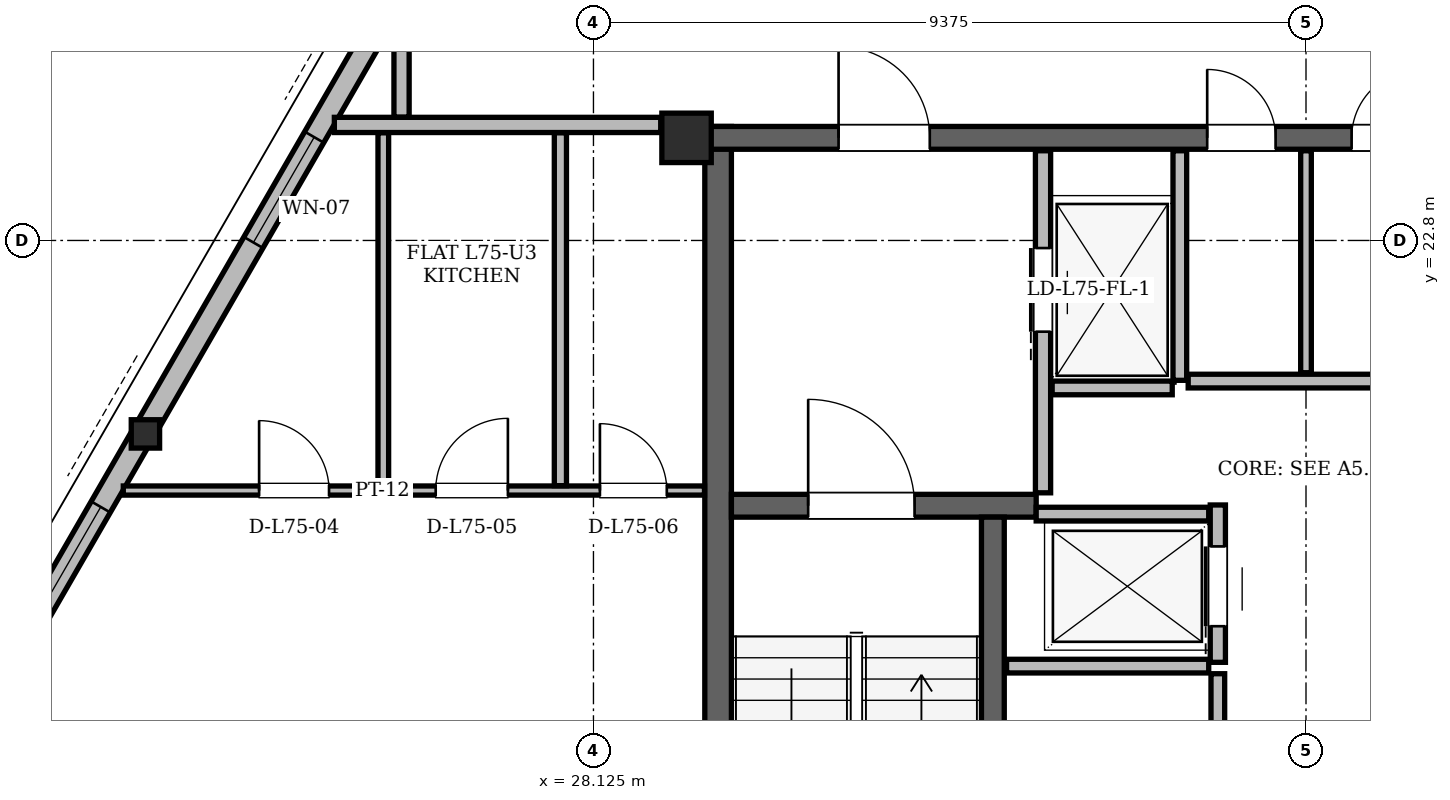
"""IFC4 building model, lengths in metres.
Left out: names, types, materials, properties, quantities, classifications, styles, units other than length and angle.
Written with IfcOpenShell. Run it as: python <this file> out.ifc"""

import sys

from ifc_helpers import new_model, si_unit, direction, frame, frame_2d, origin, origin_2d, place, context, subcontext, project, spatial, rectangle, hollow_rectangle, i_section, extrude, element, fill, save


model = new_model("IFC4")
c1 = context("Model", 3, precision=1e-05, world=origin(), true_north=direction((0.0, 1.0)))
c2 = subcontext(c1, "Body", "Model", "MODEL_VIEW")
j1 = project(units=[si_unit("LENGTHUNIT", "METRE"), si_unit("PLANEANGLEUNIT", "RADIAN")], contexts=[c1])
p1 = place(None, origin())
s1 = spatial("IfcSite", under=j1, at=p1, CompositionType="ELEMENT")
p2 = place(p1, origin())
s2 = spatial("IfcBuilding", under=s1, at=p2, CompositionType="ELEMENT")
p3 = place(p2, frame((0.0, 0.0, 285.0)))
s3 = spatial("IfcBuildingStorey", under=s2, at=p3, CompositionType="ELEMENT", Elevation=285.0)
p4 = place(p3, frame((29.35, 24.15, 0.0), z_axis=(0.0, 0.0, 1.0), x_axis=(1.0, 0.0, 0.0)))
e1 = element("IfcColumn", 1, at=p4, inside=s3, PredefinedType="COLUMN", context=c2, shape_type="SweptSolid", body=[
    extrude(hollow_rectangle(XDim=0.65, YDim=0.65, WallThickness=0.05, at=origin_2d()), origin(), (0.0, 0.0, 1.0), 3.9),
])
p5 = place(p3, frame((22.208, 20.273, 0.004), z_axis=(0.011668917641, -0.009347681336, 0.99988822236), x_axis=(0.625206622887, 0.780459274208, 0.0)))
e2 = element("IfcColumn", 2, at=p5, inside=s3, PredefinedType="COLUMN", context=c2, shape_type="SweptSolid", body=[
    extrude(i_section(OverallWidth=0.373, OverallDepth=0.373, WebThickness=0.016, FlangeThickness=0.026, at=origin_2d()), origin(), (0.0, 0.0, 1.0), 3.892),
])
p6 = place(p3, frame((29.765, 11.0, 0.0), z_axis=(0.0, 0.0, 1.0), x_axis=(0.0, 1.0, 0.0)))
e3 = element("IfcWall", 3, at=p6, inside=s3, PredefinedType="SHEAR", context=c2, shape_type="SweptSolid", body=[
    extrude(rectangle(XDim=13.3, YDim=0.35, at=frame_2d((6.65, 0.0))), origin(), (0.0, 0.0, 1.0), 3.68),
])
p7 = place(p3, frame((29.65, 24.15, 0.0), z_axis=(0.0, 0.0, 1.0), x_axis=(1.0, 0.0, 0.0)))
e4 = element("IfcWall", 4, at=p7, inside=s3, PredefinedType="SHEAR", context=c2, shape_type="SweptSolid", body=[
    extrude(rectangle(XDim=15.7, YDim=0.3, at=frame_2d((7.85, 0.0))), origin(), (0.0, 0.0, 1.0), 3.68),
])
p8 = place(p7, frame((1.7, 0.0, 0.0)))
e5 = element("IfcOpeningElement", 5, at=p8, cuts=e4, PredefinedType="OPENING", context=c2, shape_type="SweptSolid", body=[
    extrude(rectangle(XDim=1.2, YDim=2.2, at=frame_2d((0.6, 1.1))), frame((0.0, 0.15, 0.0), z_axis=(0.0, -1.0, 0.0), x_axis=(1.0, 0.0, 0.0)), (0.0, 0.0, 1.0), 0.3),
])
p9 = place(p7, frame((12.8, 0.0, 0.0)))
e6 = element("IfcOpeningElement", 6, at=p9, cuts=e4, PredefinedType="OPENING", context=c2, shape_type="SweptSolid", body=[
    extrude(rectangle(XDim=1.2, YDim=2.2, at=frame_2d((0.6, 1.1))), frame((0.0, 0.15, 0.0), z_axis=(0.0, -1.0, 0.0), x_axis=(1.0, 0.0, 0.0)), (0.0, 0.0, 1.0), 0.3),
])
p10 = place(p7, frame((6.55, 0.0, 0.0)))
e7 = element("IfcOpeningElement", 7, at=p10, cuts=e4, PredefinedType="OPENING", context=c2, shape_type="SweptSolid", body=[
    extrude(rectangle(XDim=0.9, YDim=2.05, at=frame_2d((0.45, 1.025))), frame((0.0, 0.15, 0.0), z_axis=(0.0, -1.0, 0.0), x_axis=(1.0, 0.0, 0.0)), (0.0, 0.0, 1.0), 0.3),
])
p11 = place(p7, frame((8.45, 0.0, 0.0)))
e8 = element("IfcOpeningElement", 8, at=p11, cuts=e4, PredefinedType="OPENING", context=c2, shape_type="SweptSolid", body=[
    extrude(rectangle(XDim=0.9, YDim=2.05, at=frame_2d((0.45, 1.025))), frame((0.0, 0.15, 0.0), z_axis=(0.0, -1.0, 0.0), x_axis=(1.0, 0.0, 0.0)), (0.0, 0.0, 1.0), 0.3),
])
p12 = place(p3, frame((29.94, 19.31, 0.0), z_axis=(0.0, 0.0, 1.0), x_axis=(1.0, 0.0, 0.0)))
e9 = element("IfcWall", 9, at=p12, inside=s3, PredefinedType="SHEAR", context=c2, shape_type="SweptSolid", body=[
    extrude(rectangle(XDim=4.01, YDim=0.3, at=frame_2d((2.005, 0.0))), origin(), (0.0, 0.0, 1.0), 3.68),
])
p13 = place(p12, frame((1.01, 0.0, 0.0)))
e10 = element("IfcOpeningElement", 10, at=p13, cuts=e9, PredefinedType="OPENING", context=c2, shape_type="SweptSolid", body=[
    extrude(rectangle(XDim=1.4, YDim=2.2, at=frame_2d((0.7, 1.1))), frame((0.0, 0.15, 0.0), z_axis=(0.0, -1.0, 0.0), x_axis=(1.0, 0.0, 0.0)), (0.0, 0.0, 1.0), 0.3),
])
p14 = place(p3, frame((33.38, 11.54, 0.0), z_axis=(0.0, 0.0, 1.0), x_axis=(0.0, 1.0, 0.0)))
e11 = element("IfcWall", 11, at=p14, inside=s3, PredefinedType="SHEAR", context=c2, shape_type="SweptSolid", body=[
    extrude(rectangle(XDim=7.62, YDim=0.3, at=frame_2d((3.81, 0.0))), origin(), (0.0, 0.0, 1.0), 3.68),
])
p15 = place(p3, frame((35.326, 42.995, 0.0), z_axis=(0.0, 0.0, 1.0), x_axis=(-0.499999864727, -0.866025481884, 0.0)))
e12 = element("IfcWall", 12, at=p15, inside=s3, PredefinedType="SOLIDWALL", context=c2, shape_type="SweptSolid", body=[
    extrude(rectangle(XDim=37.481, YDim=0.29, at=frame_2d((18.74, 0.0))), origin(), (0.0, 0.0, 1.0), 3.058),
])
p16 = place(p15, frame((8.034, 0.0, 0.0)))
e13 = element("IfcOpeningElement", 13, at=p16, cuts=e12, PredefinedType="OPENING", context=c2, shape_type="SweptSolid", body=[
    extrude(rectangle(XDim=1.5, YDim=2.2, at=frame_2d((0.75, 1.1))), frame((0.0, 0.145, 0.0), z_axis=(0.0, -1.0, 0.0), x_axis=(1.0, 0.0, 0.0)), (0.0, 0.0, 1.0), 0.29),
])
p17 = place(p15, frame((32.341, 0.0, 0.0)))
e14 = element("IfcOpeningElement", 14, at=p17, cuts=e12, PredefinedType="OPENING", context=c2, shape_type="SweptSolid", body=[
    extrude(rectangle(XDim=1.5, YDim=2.2, at=frame_2d((0.75, 1.1))), frame((0.0, 0.145, 0.0), z_axis=(0.0, -1.0, 0.0), x_axis=(1.0, 0.0, 0.0)), (0.0, 0.0, 1.0), 0.29),
])
p18 = place(p15, frame((35.454, 0.0, 0.85)))
e15 = element("IfcOpeningElement", 15, at=p18, cuts=e12, PredefinedType="OPENING", context=c2, shape_type="SweptSolid", body=[
    extrude(rectangle(XDim=1.2, YDim=1.48, at=frame_2d((0.6, 0.74))), frame((0.0, 0.145, 0.0), z_axis=(0.0, -1.0, 0.0), x_axis=(1.0, 0.0, 0.0)), (0.0, 0.0, 1.0), 0.29),
])
p19 = place(p15, frame((27.367, 0.0, 0.85)))
e16 = element("IfcOpeningElement", 16, at=p19, cuts=e12, PredefinedType="OPENING", context=c2, shape_type="SweptSolid", body=[
    extrude(rectangle(XDim=1.8, YDim=1.75, at=frame_2d((0.9, 0.875))), frame((0.0, 0.145, 0.0), z_axis=(0.0, -1.0, 0.0), x_axis=(1.0, 0.0, 0.0)), (0.0, 0.0, 1.0), 0.29),
])
p20 = place(p15, frame((21.75, 0.0, 0.85)))
e17 = element("IfcOpeningElement", 17, at=p20, cuts=e12, PredefinedType="OPENING", context=c2, shape_type="SweptSolid", body=[
    extrude(rectangle(XDim=1.6, YDim=1.7, at=frame_2d((0.8, 0.85))), frame((0.0, 0.145, 0.0), z_axis=(0.0, -1.0, 0.0), x_axis=(1.0, 0.0, 0.0)), (0.0, 0.0, 1.0), 0.29),
])
p21 = place(p15, frame((16.51, 0.0, 0.85)))
e18 = element("IfcOpeningElement", 18, at=p21, cuts=e12, PredefinedType="OPENING", context=c2, shape_type="SweptSolid", body=[
    extrude(rectangle(XDim=1.8, YDim=1.75, at=frame_2d((0.9, 0.875))), frame((0.0, 0.145, 0.0), z_axis=(0.0, -1.0, 0.0), x_axis=(1.0, 0.0, 0.0)), (0.0, 0.0, 1.0), 0.29),
])
p22 = place(p15, frame((3.652, 0.0, 0.85)))
e19 = element("IfcOpeningElement", 19, at=p22, cuts=e12, PredefinedType="OPENING", context=c2, shape_type="SweptSolid", body=[
    extrude(rectangle(XDim=1.2, YDim=1.48, at=frame_2d((0.6, 0.74))), frame((0.0, 0.145, 0.0), z_axis=(0.0, -1.0, 0.0), x_axis=(1.0, 0.0, 0.0)), (0.0, 0.0, 1.0), 0.29),
])
p23 = place(p15, frame((1.094, 0.0, 0.85)))
e20 = element("IfcOpeningElement", 20, at=p23, cuts=e12, PredefinedType="OPENING", context=c2, shape_type="SweptSolid", body=[
    extrude(rectangle(XDim=1.2, YDim=1.48, at=frame_2d((0.6, 0.74))), frame((0.0, 0.145, 0.0), z_axis=(0.0, -1.0, 0.0), x_axis=(1.0, 0.0, 0.0)), (0.0, 0.0, 1.0), 0.29),
])
p24 = place(p3, frame((34.04, 19.48, 0.0), z_axis=(0.0, 0.0, 1.0), x_axis=(0.0, 1.0, 0.0)))
e21 = element("IfcWall", 21, at=p24, inside=s3, PredefinedType="PARTITIONING", context=c2, shape_type="SweptSolid", body=[
    extrude(rectangle(XDim=4.5, YDim=0.2, at=frame_2d((2.25, 0.0))), origin(), (0.0, 0.0, 1.0), 3.68),
])
p25 = place(p24, frame((2.12, 0.0, 0.0)))
e22 = element("IfcOpeningElement", 22, at=p25, cuts=e21, PredefinedType="OPENING", context=c2, shape_type="SweptSolid", body=[
    extrude(rectangle(XDim=1.1, YDim=2.2, at=frame_2d((0.55, 1.1))), frame((0.0, 0.1, 0.0), z_axis=(0.0, -1.0, 0.0), x_axis=(1.0, 0.0, 0.0)), (0.0, 0.0, 1.0), 0.2),
])
p26 = place(p3, frame((35.84, 20.96, 0.0), z_axis=(0.0, 0.0, 1.0), x_axis=(0.0, 1.0, 0.0)))
e23 = element("IfcWall", 23, at=p26, inside=s3, PredefinedType="PARTITIONING", context=c2, shape_type="SweptSolid", body=[
    extrude(rectangle(XDim=3.02, YDim=0.18, at=frame_2d((1.51, 0.0))), origin(), (0.0, 0.0, 1.0), 3.68),
])
p27 = place(p3, frame((34.16, 20.86, 0.0), z_axis=(0.0, 0.0, 1.0), x_axis=(1.0, 0.0, 0.0)))
e24 = element("IfcWall", 24, at=p27, inside=s3, PredefinedType="PARTITIONING", context=c2, shape_type="SweptSolid", body=[
    extrude(rectangle(XDim=1.58, YDim=0.18, at=frame_2d((0.79, 0.0))), origin(), (0.0, 0.0, 1.0), 3.68),
])
p28 = place(p3, frame((36.34, 17.25, 0.0), z_axis=(0.0, 0.0, 1.0), x_axis=(0.0, 1.0, 0.0)))
e25 = element("IfcWall", 25, at=p28, inside=s3, PredefinedType="PARTITIONING", context=c2, shape_type="SweptSolid", body=[
    extrude(rectangle(XDim=2.07, YDim=0.2, at=frame_2d((1.035, 0.0))), origin(), (0.0, 0.0, 1.0), 3.68),
])
p29 = place(p28, frame((0.475, 0.0, 0.0)))
e26 = element("IfcOpeningElement", 26, at=p29, cuts=e25, PredefinedType="OPENING", context=c2, shape_type="SweptSolid", body=[
    extrude(rectangle(XDim=1.05, YDim=2.15, at=frame_2d((0.525, 1.075))), frame((0.0, 0.1, 0.0), z_axis=(0.0, -1.0, 0.0), x_axis=(1.0, 0.0, 0.0)), (0.0, 0.0, 1.0), 0.2),
])
p30 = place(p3, frame((33.95, 19.2, 0.0), z_axis=(0.0, 0.0, 1.0), x_axis=(1.0, 0.0, 0.0)))
e27 = element("IfcWall", 27, at=p30, inside=s3, PredefinedType="PARTITIONING", context=c2, shape_type="SweptSolid", body=[
    extrude(rectangle(XDim=2.27, YDim=0.18, at=frame_2d((1.135, 0.0))), origin(), (0.0, 0.0, 1.0), 3.68),
])
p31 = place(p3, frame((33.56, 17.2, 0.0), z_axis=(0.0, 0.0, 1.0), x_axis=(1.0, 0.0, 0.0)))
e28 = element("IfcWall", 28, at=p31, inside=s3, PredefinedType="PARTITIONING", context=c2, shape_type="SweptSolid", body=[
    extrude(rectangle(XDim=2.66, YDim=0.18, at=frame_2d((1.33, 0.0))), origin(), (0.0, 0.0, 1.0), 3.68),
])
p32 = place(p3, frame((36.34, 11.55, 0.0), z_axis=(0.0, 0.0, 1.0), x_axis=(0.0, 1.0, 0.0)))
e29 = element("IfcWall", 29, at=p32, inside=s3, PredefinedType="PARTITIONING", context=c2, shape_type="SweptSolid", body=[
    extrude(rectangle(XDim=5.55, YDim=0.18, at=frame_2d((2.775, 0.0))), origin(), (0.0, 0.0, 1.0), 3.68),
])
p33 = place(p32, frame((2.85, 0.0, 0.0)))
e30 = element("IfcOpeningElement", 30, at=p33, cuts=e29, PredefinedType="OPENING", context=c2, shape_type="SweptSolid", body=[
    extrude(rectangle(XDim=0.95, YDim=2.1, at=frame_2d((0.475, 1.05))), frame((0.0, 0.09, 0.0), z_axis=(0.0, -1.0, 0.0), x_axis=(1.0, 0.0, 0.0)), (0.0, 0.0, 1.0), 0.18),
])
p34 = place(p3, frame((35.95, 20.95, 0.0), z_axis=(0.0, 0.0, 1.0), x_axis=(1.0, 0.0, 0.0)))
e31 = element("IfcWall", 31, at=p34, inside=s3, PredefinedType="PARTITIONING", context=c2, shape_type="SweptSolid", body=[
    extrude(rectangle(XDim=3.1, YDim=0.18, at=frame_2d((1.55, 0.0))), origin(), (0.0, 0.0, 1.0), 3.68),
])
p35 = place(p3, frame((37.5, 21.06, 0.0), z_axis=(0.0, 0.0, 1.0), x_axis=(0.0, 1.0, 0.0)))
e32 = element("IfcWall", 32, at=p35, inside=s3, PredefinedType="PARTITIONING", context=c2, shape_type="SweptSolid", body=[
    extrude(rectangle(XDim=2.92, YDim=0.14, at=frame_2d((1.46, 0.0))), origin(), (0.0, 0.0, 1.0), 3.68),
])
p36 = place(p3, frame((21.939, 19.51, 0.0), z_axis=(0.0, 0.0, 1.0), x_axis=(1.0, 0.0, 0.0)))
e33 = element("IfcWall", 33, at=p36, inside=s3, PredefinedType="PARTITIONING", context=c2, shape_type="SweptSolid", body=[
    extrude(rectangle(XDim=7.647, YDim=0.12, at=frame_2d((3.823, 0.0))), origin(), (0.0, 0.0, 1.0), 2.82),
])
p37 = place(p36, frame((1.787, 0.0, 0.0)))
e34 = element("IfcOpeningElement", 34, at=p37, cuts=e33, PredefinedType="OPENING", context=c2, shape_type="SweptSolid", body=[
    extrude(rectangle(XDim=0.92, YDim=2.12, at=frame_2d((0.46, 1.06))), frame((0.0, 0.06, 0.0), z_axis=(0.0, -1.0, 0.0), x_axis=(1.0, 0.0, 0.0)), (0.0, 0.0, 1.0), 0.12),
])
p38 = place(p36, frame((4.11, 0.0, 0.0)))
e35 = element("IfcOpeningElement", 35, at=p38, cuts=e33, PredefinedType="OPENING", context=c2, shape_type="SweptSolid", body=[
    extrude(rectangle(XDim=0.95, YDim=2.1, at=frame_2d((0.475, 1.05))), frame((0.0, 0.06, 0.0), z_axis=(0.0, -1.0, 0.0), x_axis=(1.0, 0.0, 0.0)), (0.0, 0.0, 1.0), 0.12),
])
p39 = place(p36, frame((6.271, 0.0, 0.0)))
e36 = element("IfcOpeningElement", 36, at=p39, cuts=e33, PredefinedType="OPENING", context=c2, shape_type="SweptSolid", body=[
    extrude(rectangle(XDim=0.88, YDim=2.08, at=frame_2d((0.44, 1.04))), frame((0.0, 0.06, 0.0), z_axis=(0.0, -1.0, 0.0), x_axis=(1.0, 0.0, 0.0)), (0.0, 0.0, 1.0), 0.12),
])
p40 = place(p3, frame((24.716, 24.32, 0.0), z_axis=(0.0, 0.0, 1.0), x_axis=(1.0, 0.0, 0.0)))
e37 = element("IfcWall", 37, at=p40, inside=s3, PredefinedType="PARTITIONING", context=c2, shape_type="SweptSolid", body=[
    extrude(rectangle(XDim=4.294, YDim=0.2, at=frame_2d((2.147, 0.0))), origin(), (0.0, 0.0, 1.0), 3.68),
])
p41 = place(p3, frame((25.36, 19.574, 0.0), z_axis=(0.0, 0.0, 1.0), x_axis=(0.0, 1.0, 0.0)))
e38 = element("IfcWall", 38, at=p41, inside=s3, PredefinedType="PARTITIONING", context=c2, shape_type="SweptSolid", body=[
    extrude(rectangle(XDim=4.642, YDim=0.14, at=frame_2d((2.321, 0.0))), origin(), (0.0, 0.0, 1.0), 3.68),
])
p42 = place(p3, frame((25.6, 24.424, 0.0), z_axis=(0.0, 0.0, 1.0), x_axis=(0.0, 1.0, 0.0)))
e39 = element("IfcWall", 39, at=p42, inside=s3, PredefinedType="PARTITIONING", context=c2, shape_type="SweptSolid", body=[
    extrude(rectangle(XDim=1.442, YDim=0.2, at=frame_2d((0.721, 0.0))), origin(), (0.0, 0.0, 1.0), 3.058),
])
p43 = place(p3, frame((27.69, 19.574, 0.0), z_axis=(0.0, 0.0, 1.0), x_axis=(0.0, 1.0, 0.0)))
e40 = element("IfcWall", 40, at=p43, inside=s3, PredefinedType="PARTITIONING", context=c2, shape_type="SweptSolid", body=[
    extrude(rectangle(XDim=4.642, YDim=0.16, at=frame_2d((2.321, 0.0))), origin(), (0.0, 0.0, 1.0), 3.68),
])
p44 = place(p19, origin())
e41 = element("IfcWindow", 41, at=p44, inside=s3, PartitioningType="SINGLE_PANEL", PredefinedType="WINDOW", context=c2, shape_type="SweptSolid", body=[
    extrude(rectangle(XDim=1.8, YDim=1.75, at=frame_2d((0.9, 0.875))), frame((0.0, 0.03, 0.0), z_axis=(0.0, -1.0, 0.0), x_axis=(1.0, 0.0, 0.0)), (0.0, 0.0, 1.0), 0.06),
])
fill(e16, e41)
p45 = place(p20, origin())
e42 = element("IfcWindow", 42, at=p45, inside=s3, PartitioningType="SINGLE_PANEL", PredefinedType="WINDOW", context=c2, shape_type="SweptSolid", body=[
    extrude(rectangle(XDim=1.6, YDim=1.7, at=frame_2d((0.8, 0.85))), frame((0.0, 0.03, 0.0), z_axis=(0.0, -1.0, 0.0), x_axis=(1.0, 0.0, 0.0)), (0.0, 0.0, 1.0), 0.06),
])
fill(e17, e42)
p46 = place(p25, origin())
e43 = element("IfcDoor", 43, at=p46, inside=s3, OperationType="SLIDING_TO_LEFT", PredefinedType="DOOR", context=c2, shape_type="SweptSolid", body=[
    extrude(rectangle(XDim=1.1, YDim=2.2, at=frame_2d((0.55, 1.1))), frame((0.0, 0.025, 0.0), z_axis=(0.0, -1.0, 0.0), x_axis=(1.0, 0.0, 0.0)), (0.0, 0.0, 1.0), 0.05),
])
fill(e22, e43)
p47 = place(p29, origin())
e44 = element("IfcDoor", 44, at=p47, inside=s3, OperationType="SLIDING_TO_LEFT", PredefinedType="DOOR", context=c2, shape_type="SweptSolid", body=[
    extrude(rectangle(XDim=1.05, YDim=2.15, at=frame_2d((0.525, 1.075))), frame((0.0, 0.025, 0.0), z_axis=(0.0, -1.0, 0.0), x_axis=(1.0, 0.0, 0.0)), (0.0, 0.0, 1.0), 0.05),
])
fill(e26, e44)
p48 = place(p13, origin())
e45 = element("IfcDoor", 45, at=p48, inside=s3, OperationType="SINGLE_SWING_LEFT", PredefinedType="DOOR", context=c2, shape_type="SweptSolid", body=[
    extrude(rectangle(XDim=1.4, YDim=2.2, at=frame_2d((0.7, 1.1))), frame((0.0, 0.025, 0.0), z_axis=(0.0, -1.0, 0.0), x_axis=(1.0, 0.0, 0.0)), (0.0, 0.0, 1.0), 0.05),
])
fill(e10, e45)
p49 = place(p8, origin())
e46 = element("IfcDoor", 46, at=p49, inside=s3, OperationType="SINGLE_SWING_LEFT", PredefinedType="DOOR", context=c2, shape_type="SweptSolid", body=[
    extrude(rectangle(XDim=1.2, YDim=2.2, at=frame_2d((0.6, 1.1))), frame((0.0, 0.025, 0.0), z_axis=(0.0, -1.0, 0.0), x_axis=(1.0, 0.0, 0.0)), (0.0, 0.0, 1.0), 0.05),
])
fill(e5, e46)
p50 = place(p10, origin())
e47 = element("IfcDoor", 47, at=p50, inside=s3, OperationType="SINGLE_SWING_LEFT", PredefinedType="DOOR", context=c2, shape_type="SweptSolid", body=[
    extrude(rectangle(XDim=0.9, YDim=2.05, at=frame_2d((0.45, 1.025))), frame((0.0, 0.025, 0.0), z_axis=(0.0, -1.0, 0.0), x_axis=(1.0, 0.0, 0.0)), (0.0, 0.0, 1.0), 0.05),
])
fill(e7, e47)
p51 = place(p11, origin())
e48 = element("IfcDoor", 48, at=p51, inside=s3, OperationType="SINGLE_SWING_RIGHT", PredefinedType="DOOR", context=c2, shape_type="SweptSolid", body=[
    extrude(rectangle(XDim=0.9, YDim=2.05, at=frame_2d((0.45, 1.025))), frame((0.0, 0.025, 0.0), z_axis=(0.0, -1.0, 0.0), x_axis=(1.0, 0.0, 0.0)), (0.0, 0.0, 1.0), 0.05),
])
fill(e8, e48)
p52 = place(p37, origin())
e49 = element("IfcDoor", 49, at=p52, inside=s3, OperationType="SINGLE_SWING_LEFT", PredefinedType="DOOR", context=c2, shape_type="SweptSolid", body=[
    extrude(rectangle(XDim=0.92, YDim=2.12, at=frame_2d((0.46, 1.06))), frame((0.0, 0.025, 0.0), z_axis=(0.0, -1.0, 0.0), x_axis=(1.0, 0.0, 0.0)), (0.0, 0.0, 1.0), 0.05),
])
fill(e34, e49)
p53 = place(p38, origin())
e50 = element("IfcDoor", 50, at=p53, inside=s3, OperationType="SINGLE_SWING_RIGHT", PredefinedType="DOOR", context=c2, shape_type="SweptSolid", body=[
    extrude(rectangle(XDim=0.95, YDim=2.1, at=frame_2d((0.475, 1.05))), frame((0.0, 0.025, 0.0), z_axis=(0.0, -1.0, 0.0), x_axis=(1.0, 0.0, 0.0)), (0.0, 0.0, 1.0), 0.05),
])
fill(e35, e50)
p54 = place(p39, origin())
e51 = element("IfcDoor", 51, at=p54, inside=s3, OperationType="SINGLE_SWING_LEFT", PredefinedType="DOOR", context=c2, shape_type="SweptSolid", body=[
    extrude(rectangle(XDim=0.88, YDim=2.08, at=frame_2d((0.44, 1.04))), frame((0.0, 0.025, 0.0), z_axis=(0.0, -1.0, 0.0), x_axis=(1.0, 0.0, 0.0)), (0.0, 0.0, 1.0), 0.05),
])
fill(e36, e51)
save(model, sys.argv[1])
